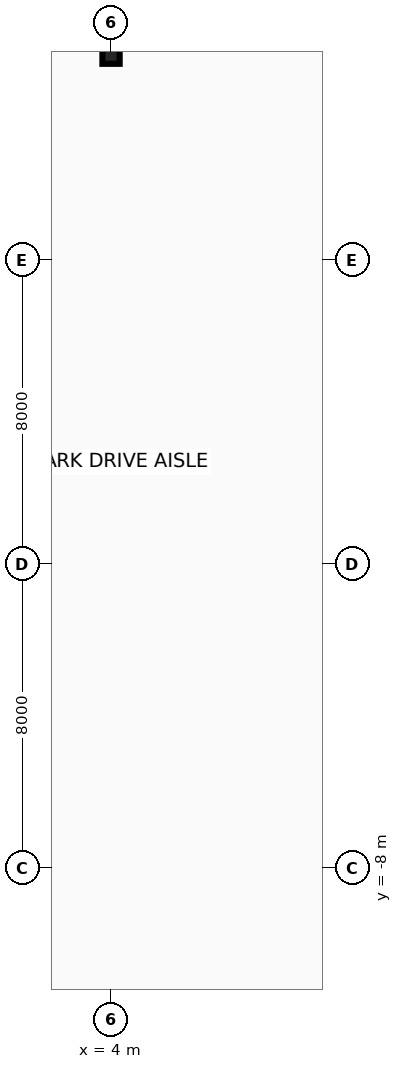
"""IFC4 building model, lengths in metres.
Left out: names, types, materials, properties, quantities, classifications, styles, units other than length and angle.
Written with IfcOpenShell. Run it as: python <this file> out.ifc"""

import sys

from ifc_helpers import new_model, si_unit, direction, frame, origin, origin_2d, place, context, subcontext, project, spatial, i_section, extrude, source, transform, mapped, element, save


model = new_model("IFC4")
c1 = context("Model", 3, precision=1e-05, world=origin(), true_north=direction((0.0, 1.0)))
c2 = subcontext(c1, "Body", "Model", "MODEL_VIEW")
j1 = project(units=[si_unit("LENGTHUNIT", "METRE"), si_unit("PLANEANGLEUNIT", "RADIAN")], contexts=[c1])
p1 = place(None, origin())
s1 = spatial("IfcSite", under=j1, at=p1, CompositionType="ELEMENT")
p2 = place(p1, origin())
s2 = spatial("IfcBuilding", under=s1, at=p2, CompositionType="ELEMENT")
p3 = place(p2, frame((0.0, 0.0, -9.6)))
s3 = spatial("IfcBuildingStorey", under=s2, at=p3, CompositionType="ELEMENT", Elevation=-9.6)
m1 = source(origin(), c2, "Body", "SweptSolid", [
    extrude(i_section(OverallWidth=0.454, OverallDepth=0.569, WebThickness=0.078, FlangeThickness=0.125, at=origin_2d()), origin(), (0.0, 0.0, 1.0), 4.8),
])
p4 = place(p3, frame((4.0, 13.45, 0.0), z_axis=(0.0, 0.0, 1.0), x_axis=(1.0, 0.0, 0.0)))
e1 = element("IfcColumn", 1, at=p4, inside=s3, PredefinedType="COLUMN", context=c2, shape_type="MappedRepresentation", body=[
    mapped(m1, transform((0.0, 0.0, 0.0), x_axis=(1.0, 0.0, 0.0), y_axis=(0.0, 1.0, 0.0), z_axis=(0.0, 0.0, 1.0), scale=1.0)),
])
save(model, sys.argv[1])
